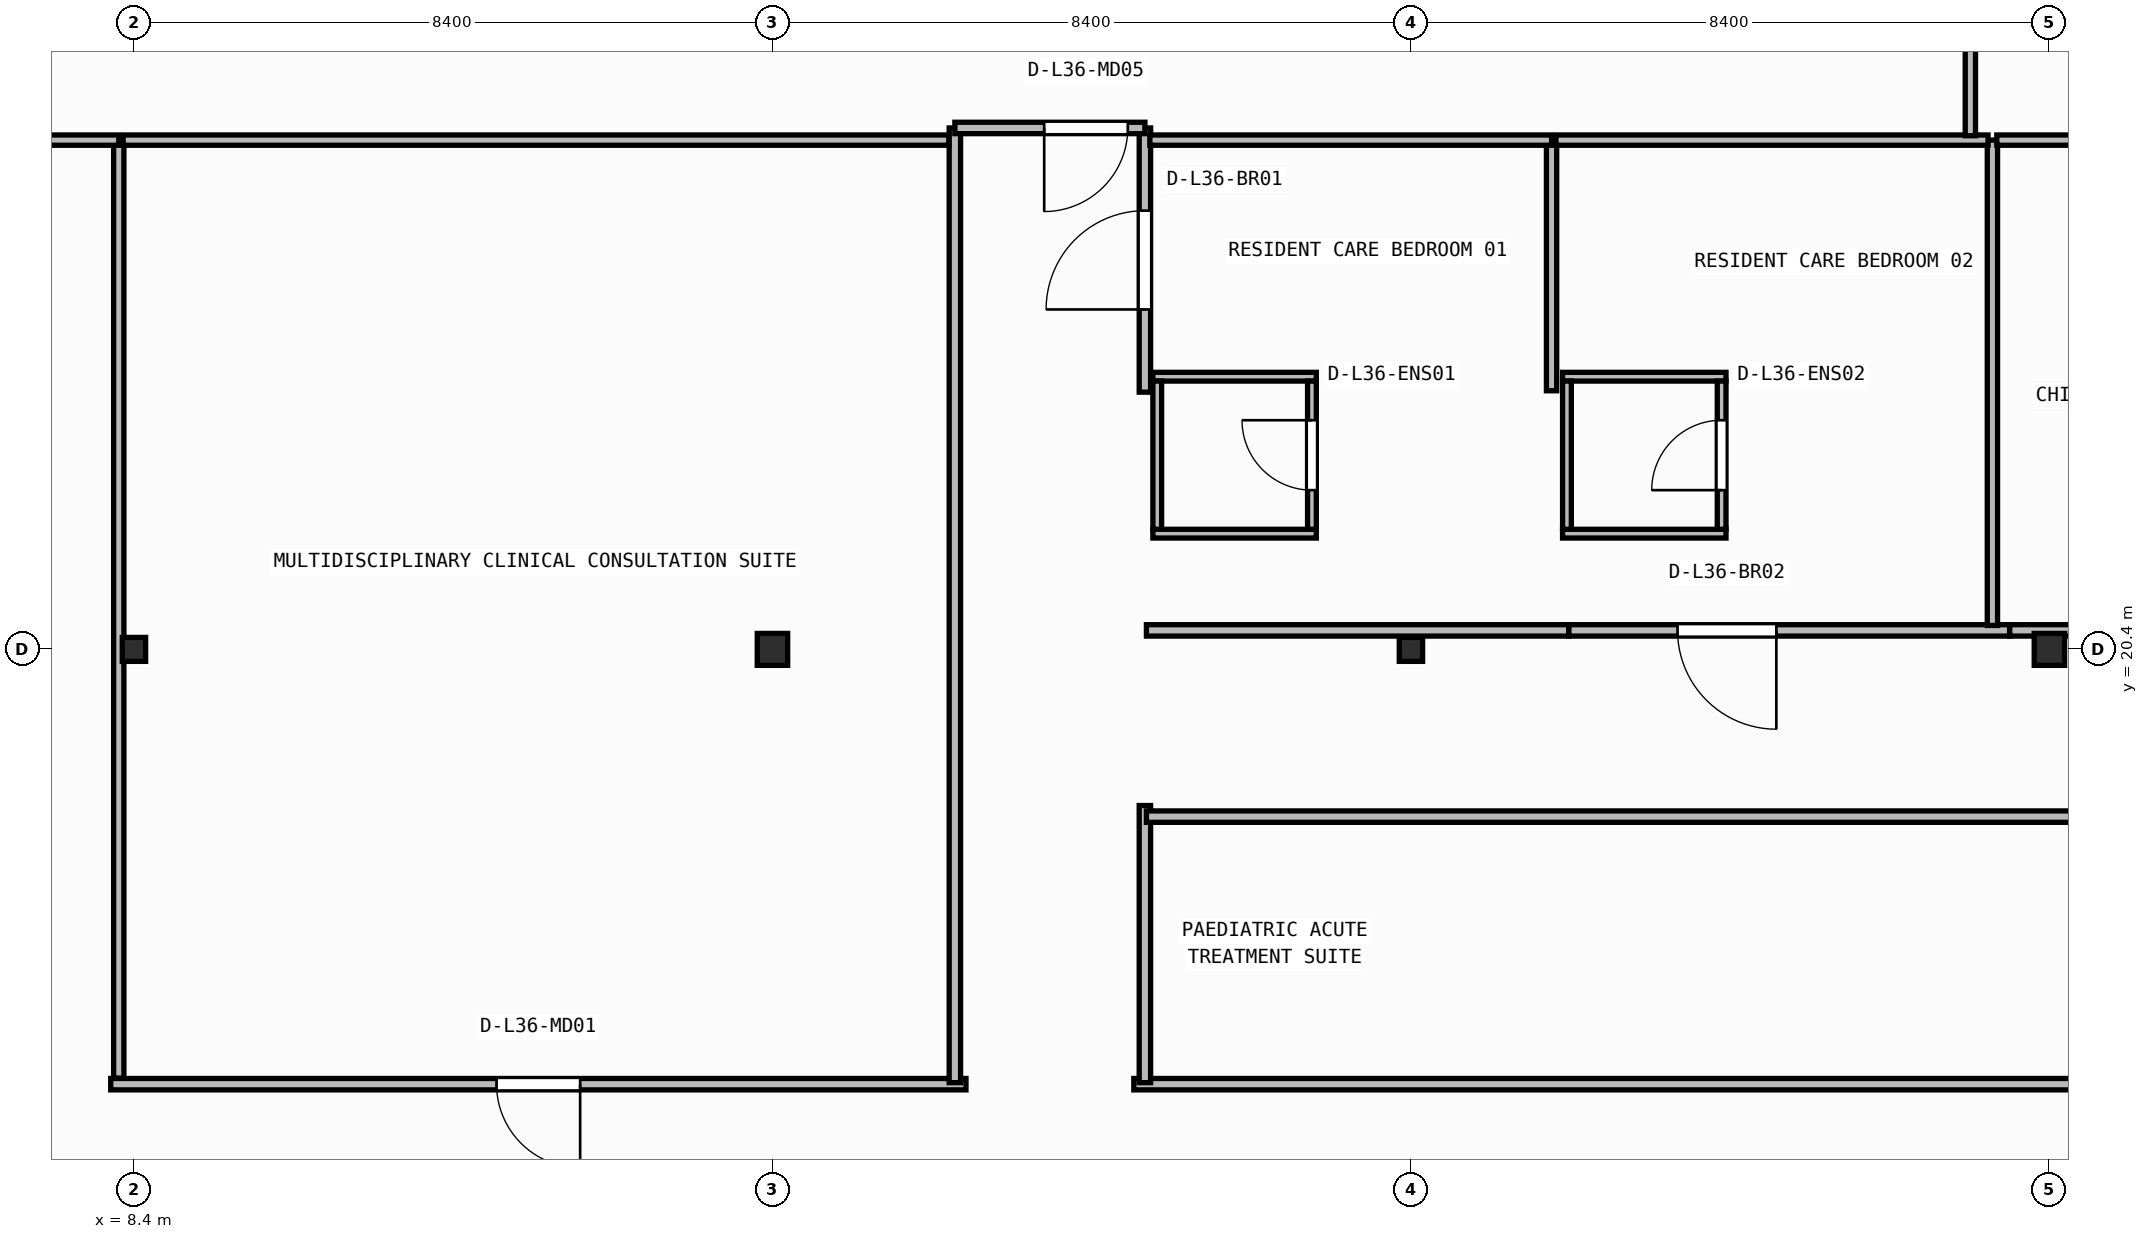
"""IFC4 building model, lengths in metres.
Left out: names, types, materials, properties, quantities, classifications, styles, units other than length and angle.
Written with IfcOpenShell. Run it as: python <this file> out.ifc"""

import sys

from ifc_helpers import new_model, si_unit, direction, frame, frame_2d, origin, origin_2d, place, context, subcontext, project, spatial, rectangle, i_section, extrude, element, fill, save


model = new_model("IFC4")
c1 = context("Model", 3, precision=1e-05, world=origin(), true_north=direction((0.0, 1.0)))
c2 = subcontext(c1, "Body", "Model", "MODEL_VIEW")
j1 = project(units=[si_unit("LENGTHUNIT", "METRE"), si_unit("PLANEANGLEUNIT", "RADIAN")], contexts=[c1])
p1 = place(None, origin())
s1 = spatial("IfcSite", under=j1, at=p1, CompositionType="ELEMENT")
p2 = place(p1, origin())
s2 = spatial("IfcBuilding", under=s1, at=p2, CompositionType="ELEMENT")
p3 = place(p2, frame((0.0, 0.0, 146.8)))
s3 = spatial("IfcBuildingStorey", under=s2, at=p3, CompositionType="ELEMENT", Elevation=146.8)
p4 = place(p3, frame((8.4, 20.4, 0.0), z_axis=(0.0, 0.0, 1.0), x_axis=(1.0, 0.0, 0.0)))
e1 = element("IfcColumn", 1, at=p4, inside=s3, PredefinedType="COLUMN", context=c2, shape_type="SweptSolid", body=[
    extrude(i_section(OverallWidth=0.307, OverallDepth=0.315, WebThickness=0.012, FlangeThickness=0.019, FilletRadius=0.017, at=origin_2d()), origin(), (0.0, 0.0, 1.0), 3.95),
])
p5 = place(p3, frame((16.8, 20.4, 0.0), z_axis=(0.0, 0.0, 1.0), x_axis=(1.0, 0.0, 0.0)))
e2 = element("IfcColumn", 2, at=p5, inside=s3, PredefinedType="COLUMN", context=c2, shape_type="SweptSolid", body=[
    extrude(i_section(OverallWidth=0.4, OverallDepth=0.42, WebThickness=0.025, FlangeThickness=0.04, at=origin_2d()), origin(), (0.0, 0.0, 1.0), 3.95),
])
p6 = place(p3, frame((25.2, 20.4, 0.0), z_axis=(0.0, 0.0, 1.0), x_axis=(1.0, 0.0, 0.0)))
e3 = element("IfcColumn", 3, at=p6, inside=s3, PredefinedType="COLUMN", context=c2, shape_type="SweptSolid", body=[
    extrude(i_section(OverallWidth=0.307, OverallDepth=0.315, WebThickness=0.012, FlangeThickness=0.019, FilletRadius=0.017, at=origin_2d()), origin(), (0.0, 0.0, 1.0), 3.95),
])
p7 = place(p3, frame((33.6, 20.4, 0.0), z_axis=(0.0, 0.0, 1.0), x_axis=(1.0, 0.0, 0.0)))
e4 = element("IfcColumn", 4, at=p7, inside=s3, PredefinedType="COLUMN", context=c2, shape_type="SweptSolid", body=[
    extrude(i_section(OverallWidth=0.4, OverallDepth=0.42, WebThickness=0.025, FlangeThickness=0.04, at=origin_2d()), origin(), (0.0, 0.0, 1.0), 3.95),
])
for number, where, z_axis, x_axis in (
    (5, (21.805, 21.923, 0.0), (0.0, 0.0, 1.0), (1.0, 0.0, 0.0)),
    (6, (21.805, 23.988, 0.0), (0.0, 0.0, 1.0), (1.0, 0.0, 0.0)),
):
    element("IfcWall", number, at=place(p3, frame(where, z_axis=z_axis, x_axis=x_axis)), inside=s3, PredefinedType="PARTITIONING", context=c2, shape_type="SweptSolid", body=[
        extrude(rectangle(XDim=2.15, YDim=0.115, at=frame_2d((1.075, 0.0))), origin(), (0.0, 0.0, 1.0), 3.71),
    ])
p8 = place(p3, frame((21.863, 21.98, 0.0), z_axis=(0.0, 0.0, 1.0), x_axis=(0.0, 1.0, 0.0)))
e7 = element("IfcWall", 7, at=p8, inside=s3, PredefinedType="PARTITIONING", context=c2, shape_type="SweptSolid", body=[
    extrude(rectangle(XDim=1.95, YDim=0.115, at=frame_2d((0.975, 0.0))), origin(), (0.0, 0.0, 1.0), 3.71),
])
p9 = place(p3, frame((23.897, 21.98, 0.0), z_axis=(0.0, 0.0, 1.0), x_axis=(0.0, 1.0, 0.0)))
e8 = element("IfcWall", 8, at=p9, inside=s3, PredefinedType="PARTITIONING", context=c2, shape_type="SweptSolid", body=[
    extrude(rectangle(XDim=1.95, YDim=0.115, at=frame_2d((0.975, 0.0))), origin(), (0.0, 0.0, 1.0), 3.71),
])
p10 = place(p9, frame((0.515, 0.0, 0.0)))
e9 = element("IfcOpeningElement", 9, at=p10, cuts=e8, PredefinedType="OPENING", context=c2, shape_type="SweptSolid", body=[
    extrude(rectangle(XDim=0.92, YDim=2.1, at=frame_2d((0.46, 1.05))), frame((0.0, 0.067, 0.0), z_axis=(0.0, -1.0, 0.0), x_axis=(1.0, 0.0, 0.0)), (0.0, 0.0, 1.0), 0.135),
])
for number, where, z_axis, x_axis in (
    (10, (27.195, 21.923, 0.0), (0.0, 0.0, 1.0), (1.0, 0.0, 0.0)),
    (11, (27.195, 23.988, 0.0), (0.0, 0.0, 1.0), (1.0, 0.0, 0.0)),
):
    element("IfcWall", number, at=place(p3, frame(where, z_axis=z_axis, x_axis=x_axis)), inside=s3, PredefinedType="PARTITIONING", context=c2, shape_type="SweptSolid", body=[
        extrude(rectangle(XDim=2.15, YDim=0.115, at=frame_2d((1.075, 0.0))), origin(), (0.0, 0.0, 1.0), 3.71),
    ])
p11 = place(p3, frame((27.252, 21.98, 0.0), z_axis=(0.0, 0.0, 1.0), x_axis=(0.0, 1.0, 0.0)))
e12 = element("IfcWall", 12, at=p11, inside=s3, PredefinedType="PARTITIONING", context=c2, shape_type="SweptSolid", body=[
    extrude(rectangle(XDim=1.95, YDim=0.115, at=frame_2d((0.975, 0.0))), origin(), (0.0, 0.0, 1.0), 3.71),
])
p12 = place(p3, frame((29.288, 21.98, 0.0), z_axis=(0.0, 0.0, 1.0), x_axis=(0.0, 1.0, 0.0)))
e13 = element("IfcWall", 13, at=p12, inside=s3, PredefinedType="PARTITIONING", context=c2, shape_type="SweptSolid", body=[
    extrude(rectangle(XDim=1.95, YDim=0.115, at=frame_2d((0.975, 0.0))), origin(), (0.0, 0.0, 1.0), 3.71),
])
p13 = place(p12, frame((0.515, 0.0, 0.0)))
e14 = element("IfcOpeningElement", 14, at=p13, cuts=e13, PredefinedType="OPENING", context=c2, shape_type="SweptSolid", body=[
    extrude(rectangle(XDim=0.92, YDim=2.1, at=frame_2d((0.46, 1.05))), frame((0.0, 0.067, 0.0), z_axis=(0.0, -1.0, 0.0), x_axis=(1.0, 0.0, 0.0)), (0.0, 0.0, 1.0), 0.135),
])
p14 = place(p3, frame((19.346, 14.68, 0.0), z_axis=(0.0, 0.0, 1.0), x_axis=(-1.0, 0.0, 0.0)))
e15 = element("IfcWall", 15, at=p14, inside=s3, PredefinedType="PARTITIONING", context=c2, shape_type="SweptSolid", body=[
    extrude(rectangle(XDim=11.252, YDim=0.15, at=frame_2d((5.626, 0.0))), origin(), (0.0, 0.0, 1.0), 3.71),
])
p15 = place(p14, frame((5.076, 0.0, 0.0)))
e16 = element("IfcOpeningElement", 16, at=p15, cuts=e15, PredefinedType="OPENING", context=c2, shape_type="SweptSolid", body=[
    extrude(rectangle(XDim=1.1, YDim=2.1, at=frame_2d((0.55, 1.05))), frame((0.0, 0.085, 0.0), z_axis=(0.0, -1.0, 0.0), x_axis=(1.0, 0.0, 0.0)), (0.0, 0.0, 1.0), 0.17),
])
p16 = place(p3, frame((56.64, 14.68, 0.0), z_axis=(0.0, 0.0, 1.0), x_axis=(-1.0, 0.0, 0.0)))
e17 = element("IfcWall", 17, at=p16, inside=s3, PredefinedType="PARTITIONING", context=c2, shape_type="SweptSolid", body=[
    extrude(rectangle(XDim=35.086, YDim=0.15, at=frame_2d((17.543, 0.0))), origin(), (0.0, 0.0, 1.0), 3.71),
])
p17 = place(p16, frame((16.993, 0.0, 0.0)))
e18 = element("IfcOpeningElement", 18, at=p17, cuts=e17, PredefinedType="OPENING", context=c2, shape_type="SweptSolid", body=[
    extrude(rectangle(XDim=1.1, YDim=2.1, at=frame_2d((0.55, 1.05))), frame((0.0, 0.085, 0.0), z_axis=(0.0, -1.0, 0.0), x_axis=(1.0, 0.0, 0.0)), (0.0, 0.0, 1.0), 0.17),
])
p18 = place(p3, frame((19.2, 27.26, 0.0), z_axis=(0.0, 0.0, 1.0), x_axis=(0.0, -1.0, 0.0)))
e19 = element("IfcWall", 19, at=p18, inside=s3, PredefinedType="PARTITIONING", context=c2, shape_type="SweptSolid", body=[
    extrude(rectangle(XDim=12.56, YDim=0.15, at=frame_2d((6.28, 0.0))), origin(), (0.0, 0.0, 1.0), 3.71),
])
p19 = place(p3, frame((21.7, 14.7, 0.0), z_axis=(0.0, 0.0, 1.0), x_axis=(0.0, 1.0, 0.0)))
e20 = element("IfcWall", 20, at=p19, inside=s3, PredefinedType="PARTITIONING", context=c2, shape_type="SweptSolid", body=[
    extrude(rectangle(XDim=3.646, YDim=0.15, at=frame_2d((1.823, 0.0))), origin(), (0.0, 0.0, 1.0), 3.71),
])
p20 = place(p3, frame((21.7, 23.784, 0.0), z_axis=(0.0, 0.0, 1.0), x_axis=(0.0, 1.0, 0.0)))
e21 = element("IfcWall", 21, at=p20, inside=s3, PredefinedType="PARTITIONING", context=c2, shape_type="SweptSolid", body=[
    extrude(rectangle(XDim=3.476, YDim=0.15, at=frame_2d((1.738, 0.0))), origin(), (0.0, 0.0, 1.0), 3.71),
])
p21 = place(p20, frame((1.088, 0.0, 0.0)))
e22 = element("IfcOpeningElement", 22, at=p21, cuts=e21, PredefinedType="OPENING", context=c2, shape_type="SweptSolid", body=[
    extrude(rectangle(XDim=1.3, YDim=2.15, at=frame_2d((0.65, 1.075))), frame((0.0, 0.085, 0.0), z_axis=(0.0, -1.0, 0.0), x_axis=(1.0, 0.0, 0.0)), (0.0, 0.0, 1.0), 0.17),
])
p22 = place(p3, frame((21.7, 27.26, 0.0), z_axis=(0.0, 0.0, 1.0), x_axis=(-1.0, 0.0, 0.0)))
e23 = element("IfcWall", 23, at=p22, inside=s3, PredefinedType="PARTITIONING", context=c2, shape_type="SweptSolid", body=[
    extrude(rectangle(XDim=2.5, YDim=0.15, at=frame_2d((1.25, 0.0))), origin(), (0.0, 0.0, 1.0), 3.71),
])
p23 = place(p22, frame((0.225, 0.0, 0.0)))
e24 = element("IfcOpeningElement", 24, at=p23, cuts=e23, PredefinedType="OPENING", context=c2, shape_type="SweptSolid", body=[
    extrude(rectangle(XDim=1.1, YDim=2.1, at=frame_2d((0.55, 1.05))), frame((0.0, 0.085, 0.0), z_axis=(0.0, -1.0, 0.0), x_axis=(1.0, 0.0, 0.0)), (0.0, 0.0, 1.0), 0.17),
])
p24 = place(p3, frame((21.72, 18.2, 0.0), z_axis=(0.0, 0.0, 1.0), x_axis=(1.0, 0.0, 0.0)))
e25 = element("IfcWall", 25, at=p24, inside=s3, PredefinedType="PARTITIONING", context=c2, shape_type="SweptSolid", body=[
    extrude(rectangle(XDim=34.92, YDim=0.15, at=frame_2d((17.46, 0.0))), origin(), (0.0, 0.0, 1.0), 3.71),
])
p25 = place(p3, frame((27.276, 20.65, 0.0), z_axis=(0.0, 0.0, 1.0), x_axis=(-1.0, 0.0, 0.0)))
e26 = element("IfcWall", 26, at=p25, inside=s3, PredefinedType="PARTITIONING", context=c2, shape_type="SweptSolid", body=[
    extrude(rectangle(XDim=5.556, YDim=0.15, at=frame_2d((2.778, 0.0))), origin(), (0.0, 0.0, 1.0), 3.083),
])
p26 = place(p3, frame((33.076, 20.65, 0.0), z_axis=(0.0, 0.0, 1.0), x_axis=(-1.0, 0.0, 0.0)))
e27 = element("IfcWall", 27, at=p26, inside=s3, PredefinedType="PARTITIONING", context=c2, shape_type="SweptSolid", body=[
    extrude(rectangle(XDim=5.798, YDim=0.15, at=frame_2d((2.899, 0.0))), origin(), (0.0, 0.0, 1.0), 3.083),
])
p27 = place(p26, frame((3.069, 0.0, 0.0)))
e28 = element("IfcOpeningElement", 28, at=p27, cuts=e27, PredefinedType="OPENING", context=c2, shape_type="SweptSolid", body=[
    extrude(rectangle(XDim=1.3, YDim=2.15, at=frame_2d((0.65, 1.075))), frame((0.0, 0.085, 0.0), z_axis=(0.0, -1.0, 0.0), x_axis=(1.0, 0.0, 0.0)), (0.0, 0.0, 1.0), 0.17),
])
p28 = place(p3, frame((39.336, 20.65, 0.0), z_axis=(0.0, 0.0, 1.0), x_axis=(-1.0, 0.0, 0.0)))
e29 = element("IfcWall", 29, at=p28, inside=s3, PredefinedType="PARTITIONING", context=c2, shape_type="SweptSolid", body=[
    extrude(rectangle(XDim=6.258, YDim=0.15, at=frame_2d((3.129, 0.0))), origin(), (0.0, 0.0, 1.0), 3.083),
])
p29 = place(p28, frame((0.319, 0.0, 0.0)))
e30 = element("IfcOpeningElement", 30, at=p29, cuts=e29, PredefinedType="OPENING", context=c2, shape_type="SweptSolid", body=[
    extrude(rectangle(XDim=1.1, YDim=2.1, at=frame_2d((0.55, 1.05))), frame((0.0, 0.085, 0.0), z_axis=(0.0, -1.0, 0.0), x_axis=(1.0, 0.0, 0.0)), (0.0, 0.0, 1.0), 0.17),
])
p30 = place(p3, frame((8.2, 14.76, 0.0), z_axis=(0.0, 0.0, 1.0), x_axis=(0.0, 1.0, 0.0)))
e31 = element("IfcWall", 31, at=p30, inside=s3, PredefinedType="PARTITIONING", context=c2, shape_type="SweptSolid", body=[
    extrude(rectangle(XDim=12.34, YDim=0.135, at=frame_2d((6.17, 0.0))), origin(), (0.0, 0.0, 1.0), 3.152),
])
p31 = place(p3, frame((8.2, 27.1, 0.0), z_axis=(0.0, 0.0, 1.0), x_axis=(-1.0, 0.0, 0.0)))
e32 = element("IfcWall", 32, at=p31, inside=s3, PredefinedType="PARTITIONING", context=c2, shape_type="SweptSolid", body=[
    extrude(rectangle(XDim=7.96, YDim=0.135, at=frame_2d((3.98, 0.0))), origin(), (0.0, 0.0, 1.0), 3.71),
])
p32 = place(p3, frame((19.12, 27.1, 0.0), z_axis=(0.0, 0.0, 1.0), x_axis=(-1.0, 0.0, 0.0)))
e33 = element("IfcWall", 33, at=p32, inside=s3, PredefinedType="PARTITIONING", context=c2, shape_type="SweptSolid", body=[
    extrude(rectangle(XDim=10.863, YDim=0.135, at=frame_2d((5.431, 0.0))), origin(), (0.0, 0.0, 1.0), 3.71),
])
p33 = place(p3, frame((27.05, 23.802, 0.0), z_axis=(0.0, 0.0, 1.0), x_axis=(0.0, 1.0, 0.0)))
e34 = element("IfcWall", 34, at=p33, inside=s3, PredefinedType="PARTITIONING", context=c2, shape_type="SweptSolid", body=[
    extrude(rectangle(XDim=3.298, YDim=0.135, at=frame_2d((1.649, 0.0))), origin(), (0.0, 0.0, 1.0), 3.71),
])
p34 = place(p3, frame((27.05, 27.1, 0.0), z_axis=(0.0, 0.0, 1.0), x_axis=(-1.0, 0.0, 0.0)))
e35 = element("IfcWall", 35, at=p34, inside=s3, PredefinedType="PARTITIONING", context=c2, shape_type="SweptSolid", body=[
    extrude(rectangle(XDim=5.285, YDim=0.135, at=frame_2d((2.643, 0.0))), origin(), (0.0, 0.0, 1.0), 3.71),
])
p35 = place(p3, frame((32.85, 20.715, 0.0), z_axis=(0.0, 0.0, 1.0), x_axis=(0.0, 1.0, 0.0)))
e36 = element("IfcWall", 36, at=p35, inside=s3, PredefinedType="PARTITIONING", context=c2, shape_type="SweptSolid", body=[
    extrude(rectangle(XDim=6.385, YDim=0.135, at=frame_2d((3.192, 0.0))), origin(), (0.0, 0.0, 1.0), 3.71),
])
p36 = place(p3, frame((32.792, 27.1, 0.0), z_axis=(0.0, 0.0, 1.0), x_axis=(-1.0, 0.0, 0.0)))
e37 = element("IfcWall", 37, at=p36, inside=s3, PredefinedType="PARTITIONING", context=c2, shape_type="SweptSolid", body=[
    extrude(rectangle(XDim=5.685, YDim=0.135, at=frame_2d((2.843, 0.0))), origin(), (0.0, 0.0, 1.0), 3.71),
])
p37 = place(p3, frame((39.11, 27.1, 0.0), z_axis=(0.0, 0.0, 1.0), x_axis=(-1.0, 0.0, 0.0)))
e38 = element("IfcWall", 38, at=p37, inside=s3, PredefinedType="PARTITIONING", context=c2, shape_type="SweptSolid", body=[
    extrude(rectangle(XDim=6.203, YDim=0.135, at=frame_2d((3.101, 0.0))), origin(), (0.0, 0.0, 1.0), 3.71),
])
p38 = place(p37, frame((0.318, 0.0, 0.0)))
e39 = element("IfcOpeningElement", 39, at=p38, cuts=e38, PredefinedType="OPENING", context=c2, shape_type="SweptSolid", body=[
    extrude(rectangle(XDim=1.1, YDim=2.1, at=frame_2d((0.55, 1.05))), frame((0.0, 0.077, 0.0), z_axis=(0.0, -1.0, 0.0), x_axis=(1.0, 0.0, 0.0)), (0.0, 0.0, 1.0), 0.155),
])
p39 = place(p3, frame((32.56, 27.157, 0.0), z_axis=(0.0, 0.0, 1.0), x_axis=(0.0, 1.0, 0.0)))
e40 = element("IfcWall", 40, at=p39, inside=s3, PredefinedType="PARTITIONING", context=c2, shape_type="SweptSolid", body=[
    extrude(rectangle(XDim=4.166, YDim=0.135, at=frame_2d((2.083, 0.0))), origin(), (0.0, 0.0, 1.0), 3.71),
])
p40 = place(p10, origin())
e41 = element("IfcDoor", 41, at=p40, inside=s3, OperationType="SINGLE_SWING_RIGHT", PredefinedType="DOOR", context=c2, shape_type="SweptSolid", body=[
    extrude(rectangle(XDim=0.92, YDim=2.1, at=frame_2d((0.46, 1.05))), frame((0.0, 0.025, 0.0), z_axis=(0.0, -1.0, 0.0), x_axis=(1.0, 0.0, 0.0)), (0.0, 0.0, 1.0), 0.05),
])
fill(e9, e41)
p41 = place(p13, origin())
e42 = element("IfcDoor", 42, at=p41, inside=s3, OperationType="SINGLE_SWING_LEFT", PredefinedType="DOOR", context=c2, shape_type="SweptSolid", body=[
    extrude(rectangle(XDim=0.92, YDim=2.1, at=frame_2d((0.46, 1.05))), frame((0.0, 0.025, 0.0), z_axis=(0.0, -1.0, 0.0), x_axis=(1.0, 0.0, 0.0)), (0.0, 0.0, 1.0), 0.05),
])
fill(e14, e42)
p42 = place(p15, origin())
e43 = element("IfcDoor", 43, at=p42, inside=s3, OperationType="SINGLE_SWING_LEFT", PredefinedType="DOOR", context=c2, shape_type="SweptSolid", body=[
    extrude(rectangle(XDim=1.1, YDim=2.1, at=frame_2d((0.55, 1.05))), frame((0.0, 0.025, 0.0), z_axis=(0.0, -1.0, 0.0), x_axis=(1.0, 0.0, 0.0)), (0.0, 0.0, 1.0), 0.05),
])
fill(e16, e43)
p43 = place(p21, origin())
e44 = element("IfcDoor", 44, at=p43, inside=s3, OperationType="SINGLE_SWING_LEFT", PredefinedType="DOOR", context=c2, shape_type="SweptSolid", body=[
    extrude(rectangle(XDim=1.3, YDim=2.15, at=frame_2d((0.65, 1.075))), frame((0.0, 0.025, 0.0), z_axis=(0.0, -1.0, 0.0), x_axis=(1.0, 0.0, 0.0)), (0.0, 0.0, 1.0), 0.05),
])
fill(e22, e44)
p44 = place(p23, origin())
e45 = element("IfcDoor", 45, at=p44, inside=s3, OperationType="SINGLE_SWING_RIGHT", PredefinedType="DOOR", context=c2, shape_type="SweptSolid", body=[
    extrude(rectangle(XDim=1.1, YDim=2.1, at=frame_2d((0.55, 1.05))), frame((0.0, 0.025, 0.0), z_axis=(0.0, -1.0, 0.0), x_axis=(1.0, 0.0, 0.0)), (0.0, 0.0, 1.0), 0.05),
])
fill(e24, e45)
p45 = place(p27, origin())
e46 = element("IfcDoor", 46, at=p45, inside=s3, OperationType="SINGLE_SWING_LEFT", PredefinedType="DOOR", context=c2, shape_type="SweptSolid", body=[
    extrude(rectangle(XDim=1.3, YDim=2.15, at=frame_2d((0.65, 1.075))), frame((0.0, 0.025, 0.0), z_axis=(0.0, -1.0, 0.0), x_axis=(1.0, 0.0, 0.0)), (0.0, 0.0, 1.0), 0.05),
])
fill(e28, e46)
save(model, sys.argv[1])
